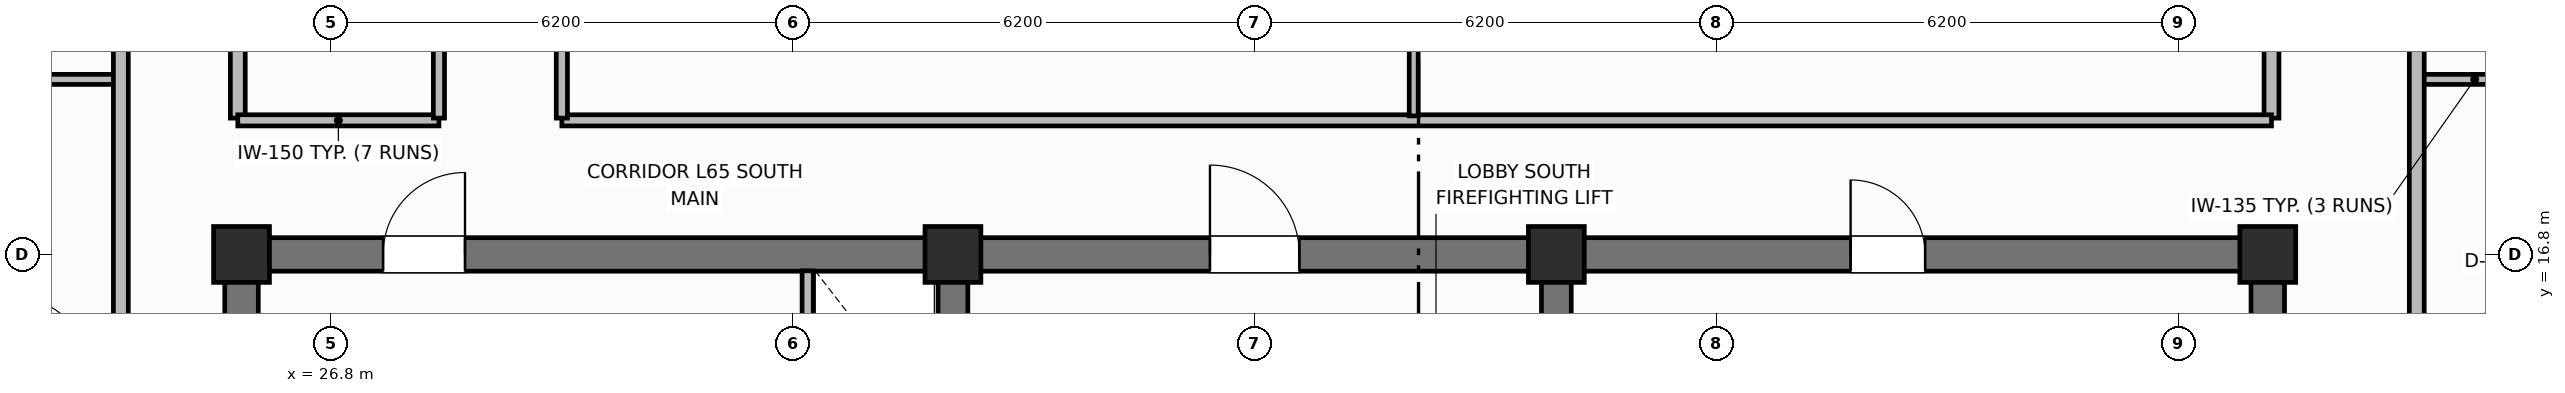
"""IFC4 building model, lengths in metres.
Left out: names, types, materials, properties, quantities, classifications, styles, units other than length and angle.
Written with IfcOpenShell. Run it as: python <this file> out.ifc"""

import sys

from ifc_helpers import new_model, si_unit, direction, frame, frame_2d, origin, origin_2d, place, context, subcontext, project, spatial, rectangle, extrude, element, fill, save


model = new_model("IFC4")
c1 = context("Model", 3, precision=1e-05, world=origin(), true_north=direction((0.0, 1.0)))
c2 = subcontext(c1, "Body", "Model", "MODEL_VIEW")
j1 = project(units=[si_unit("LENGTHUNIT", "METRE"), si_unit("PLANEANGLEUNIT", "RADIAN")], contexts=[c1])
p1 = place(None, origin())
s1 = spatial("IfcSite", under=j1, at=p1, CompositionType="ELEMENT")
p2 = place(p1, origin())
s2 = spatial("IfcBuilding", under=s1, at=p2, CompositionType="ELEMENT")
p3 = place(p2, frame((0.0, 0.0, 260.2)))
s3 = spatial("IfcBuildingStorey", under=s2, at=p3, CompositionType="ELEMENT", Elevation=260.2)
for number, where, z_axis, x_axis in (
    (1, (25.6, 10.825, 0.0), (0.0, 0.0, 1.0), (0.0, 1.0, 0.0)),
    (2, (52.8, 10.825, 0.0), (0.0, 0.0, 1.0), (0.0, 1.0, 0.0)),
):
    element("IfcWall", number, at=place(p3, frame(where, z_axis=z_axis, x_axis=x_axis)), inside=s3, PredefinedType="SHEAR", context=c2, shape_type="SweptSolid", body=[
        extrude(rectangle(XDim=5.75, YDim=0.45, at=frame_2d((2.875, 0.0))), origin(), (0.0, 0.0, 1.0), 3.7),
    ])
p4 = place(p3, frame((25.6, 16.8, 0.0), z_axis=(0.0, 0.0, 1.0), x_axis=(1.0, 0.0, 0.0)))
e3 = element("IfcWall", 3, at=p4, inside=s3, PredefinedType="SHEAR", context=c2, shape_type="SweptSolid", body=[
    extrude(rectangle(XDim=27.2, YDim=0.45, at=frame_2d((13.6, 0.0))), origin(), (0.0, 0.0, 1.0), 3.7),
])
p5 = place(p4, frame((1.9, 0.0, 0.0)))
e4 = element("IfcOpeningElement", 4, at=p5, cuts=e3, PredefinedType="OPENING", context=c2, shape_type="SweptSolid", body=[
    extrude(rectangle(XDim=1.1, YDim=2.15, at=frame_2d((0.55, 1.075))), frame((0.0, 0.235, 0.0), z_axis=(0.0, -1.0, 0.0), x_axis=(1.0, 0.0, 0.0)), (0.0, 0.0, 1.0), 0.47),
])
p6 = place(p4, frame((13.0, 0.0, 0.0)))
e5 = element("IfcOpeningElement", 5, at=p6, cuts=e3, PredefinedType="OPENING", context=c2, shape_type="SweptSolid", body=[
    extrude(rectangle(XDim=1.2, YDim=2.15, at=frame_2d((0.6, 1.075))), frame((0.0, 0.235, 0.0), z_axis=(0.0, -1.0, 0.0), x_axis=(1.0, 0.0, 0.0)), (0.0, 0.0, 1.0), 0.47),
])
p7 = place(p4, frame((21.6, 0.0, 0.0)))
e6 = element("IfcOpeningElement", 6, at=p7, cuts=e3, PredefinedType="OPENING", context=c2, shape_type="SweptSolid", body=[
    extrude(rectangle(XDim=1.0, YDim=2.15, at=frame_2d((0.5, 1.075))), frame((0.0, 0.235, 0.0), z_axis=(0.0, -1.0, 0.0), x_axis=(1.0, 0.0, 0.0)), (0.0, 0.0, 1.0), 0.47),
])
for number, where, z_axis, x_axis in (
    (7, (35.15, 10.825, 0.0), (0.0, 0.0, 1.0), (0.0, 1.0, 0.0)),
    (8, (43.25, 10.825, 0.0), (0.0, 0.0, 1.0), (0.0, 1.0, 0.0)),
):
    element("IfcWall", number, at=place(p3, frame(where, z_axis=z_axis, x_axis=x_axis)), inside=s3, PredefinedType="SHEAR", context=c2, shape_type="SweptSolid", body=[
        extrude(rectangle(XDim=5.75, YDim=0.4, at=frame_2d((2.875, 0.0))), origin(), (0.0, 0.0, 1.0), 3.7),
    ])
for number, where, z_axis, x_axis in (
    (9, (25.6, 16.8, 0.0), (0.0, 0.0, 1.0), (1.0, 0.0, 0.0)),
    (10, (35.15, 16.8, 0.0), (0.0, 0.0, 1.0), (1.0, 0.0, 0.0)),
    (11, (43.25, 16.8, 0.0), (0.0, 0.0, 1.0), (1.0, 0.0, 0.0)),
    (12, (52.8, 16.8, 0.0), (0.0, 0.0, 1.0), (1.0, 0.0, 0.0)),
):
    element("IfcColumn", number, at=place(p3, frame(where, z_axis=z_axis, x_axis=x_axis)), inside=s3, PredefinedType="COLUMN", context=c2, shape_type="SweptSolid", body=[
        extrude(rectangle(XDim=0.75, YDim=0.75, at=origin_2d()), origin(), (0.0, 0.0, 1.0), 3.7),
    ])
p8 = place(p3, frame((33.2, 14.5, 0.0), z_axis=(0.0, 0.0, 1.0), x_axis=(0.0, 1.0, 0.0)))
e13 = element("IfcWall", 13, at=p8, inside=s3, PredefinedType="PARTITIONING", context=c2, shape_type="SweptSolid", body=[
    extrude(rectangle(XDim=2.08, YDim=0.15, at=frame_2d((1.04, 0.0))), origin(), (0.0, 0.0, 1.0), 2.56),
])
p9 = place(p8, frame((0.55, 0.0, 0.0)))
e14 = element("IfcOpeningElement", 14, at=p9, cuts=e13, PredefinedType="OPENING", context=c2, shape_type="SweptSolid", body=[
    extrude(rectangle(XDim=0.85, YDim=2.05, at=frame_2d((0.425, 1.025))), frame((0.0, 0.085, 0.0), z_axis=(0.0, -1.0, 0.0), x_axis=(1.0, 0.0, 0.0)), (0.0, 0.0, 1.0), 0.17),
])
for number, where, z_axis, x_axis in (
    (15, (25.55, 18.63, 0.0), (0.0, 0.0, 1.0), (0.0, 1.0, 0.0)),
    (16, (52.85, 18.63, 0.0), (0.0, 0.0, 1.0), (0.0, 1.0, 0.0)),
):
    element("IfcWall", number, at=place(p3, frame(where, z_axis=z_axis, x_axis=x_axis)), inside=s3, PredefinedType="PARTITIONING", context=c2, shape_type="SweptSolid", body=[
        extrude(rectangle(XDim=19.14, YDim=0.2, at=frame_2d((9.57, 0.0))), origin(), (0.0, 0.0, 1.0), 2.56),
    ])
p10 = place(p3, frame((25.55, 18.6, 0.0), z_axis=(0.0, 0.0, 1.0), x_axis=(1.0, 0.0, 0.0)))
e17 = element("IfcWall", 17, at=p10, inside=s3, PredefinedType="PARTITIONING", context=c2, shape_type="SweptSolid", body=[
    extrude(rectangle(XDim=2.7, YDim=0.15, at=frame_2d((1.35, 0.0))), origin(), (0.0, 0.0, 1.0), 2.56),
])
p11 = place(p3, frame((29.9, 18.6, 0.0), z_axis=(0.0, 0.0, 1.0), x_axis=(1.0, 0.0, 0.0)))
e18 = element("IfcWall", 18, at=p11, inside=s3, PredefinedType="PARTITIONING", context=c2, shape_type="SweptSolid", body=[
    extrude(rectangle(XDim=22.95, YDim=0.15, at=frame_2d((11.475, 0.0))), origin(), (0.0, 0.0, 1.0), 2.56),
])
p12 = place(p3, frame((41.335, 18.66, 0.0), z_axis=(0.0, 0.0, 1.0), x_axis=(0.0, 1.0, 0.0)))
e19 = element("IfcWall", 19, at=p12, inside=s3, PredefinedType="PARTITIONING", context=c2, shape_type="SweptSolid", body=[
    extrude(rectangle(XDim=6.821, YDim=0.12, at=frame_2d((3.41, 0.0))), origin(), (0.0, 0.0, 1.0), 2.56),
])
p13 = place(p12, frame((2.0, 0.0, 0.0)))
e20 = element("IfcOpeningElement", 20, at=p13, cuts=e19, PredefinedType="OPENING", context=c2, shape_type="SweptSolid", body=[
    extrude(rectangle(XDim=0.9, YDim=2.1, at=frame_2d((0.45, 1.05))), frame((0.0, 0.07, 0.0), z_axis=(0.0, -1.0, 0.0), x_axis=(1.0, 0.0, 0.0)), (0.0, 0.0, 1.0), 0.14),
])
p14 = place(p3, frame((28.25, 18.63, 0.0), z_axis=(0.0, 0.0, 1.0), x_axis=(0.0, 1.0, 0.0)))
e21 = element("IfcWall", 21, at=p14, inside=s3, PredefinedType="PARTITIONING", context=c2, shape_type="SweptSolid", body=[
    extrude(rectangle(XDim=19.14, YDim=0.15, at=frame_2d((9.57, 0.0))), origin(), (0.0, 0.0, 1.0), 2.56),
])
p15 = place(p14, frame((3.0, 0.0, 0.0)))
e22 = element("IfcOpeningElement", 22, at=p15, cuts=e21, PredefinedType="OPENING", context=c2, shape_type="SweptSolid", body=[
    extrude(rectangle(XDim=0.9, YDim=2.1, at=frame_2d((0.45, 1.05))), frame((0.0, 0.085, 0.0), z_axis=(0.0, -1.0, 0.0), x_axis=(1.0, 0.0, 0.0)), (0.0, 0.0, 1.0), 0.17),
])
p16 = place(p14, frame((11.5, 0.0, 0.0)))
e23 = element("IfcOpeningElement", 23, at=p16, cuts=e21, PredefinedType="OPENING", context=c2, shape_type="SweptSolid", body=[
    extrude(rectangle(XDim=0.9, YDim=2.1, at=frame_2d((0.45, 1.05))), frame((0.0, 0.085, 0.0), z_axis=(0.0, -1.0, 0.0), x_axis=(1.0, 0.0, 0.0)), (0.0, 0.0, 1.0), 0.17),
])
p17 = place(p3, frame((29.9, 18.63, 0.0), z_axis=(0.0, 0.0, 1.0), x_axis=(0.0, 1.0, 0.0)))
e24 = element("IfcWall", 24, at=p17, inside=s3, PredefinedType="PARTITIONING", context=c2, shape_type="SweptSolid", body=[
    extrude(rectangle(XDim=19.14, YDim=0.15, at=frame_2d((9.57, 0.0))), origin(), (0.0, 0.0, 1.0), 2.56),
])
p18 = place(p17, frame((2.2, 0.0, 0.0)))
e25 = element("IfcOpeningElement", 25, at=p18, cuts=e24, PredefinedType="OPENING", context=c2, shape_type="SweptSolid", body=[
    extrude(rectangle(XDim=1.0, YDim=2.15, at=frame_2d((0.5, 1.075))), frame((0.0, 0.085, 0.0), z_axis=(0.0, -1.0, 0.0), x_axis=(1.0, 0.0, 0.0)), (0.0, 0.0, 1.0), 0.17),
])
p19 = place(p17, frame((8.89, 0.0, 0.0)))
e26 = element("IfcOpeningElement", 26, at=p19, cuts=e24, PredefinedType="OPENING", context=c2, shape_type="SweptSolid", body=[
    extrude(rectangle(XDim=1.0, YDim=2.15, at=frame_2d((0.5, 1.075))), frame((0.0, 0.085, 0.0), z_axis=(0.0, -1.0, 0.0), x_axis=(1.0, 0.0, 0.0)), (0.0, 0.0, 1.0), 0.17),
])
p20 = place(p3, frame((22.03, 19.15, 0.0), z_axis=(0.0, 0.0, 1.0), x_axis=(1.0, 0.0, 0.0)))
e27 = element("IfcWall", 27, at=p20, inside=s3, PredefinedType="PARTITIONING", context=c2, shape_type="SweptSolid", body=[
    extrude(rectangle(XDim=1.95, YDim=0.135, at=frame_2d((0.975, 0.0))), origin(), (0.0, 0.0, 1.0), 2.56),
])
p21 = place(p3, frame((23.98, 9.95, 0.0), z_axis=(0.0, 0.0, 1.0), x_axis=(0.0, 1.0, 0.0)))
e28 = element("IfcWall", 28, at=p21, inside=s3, PredefinedType="PARTITIONING", context=c2, shape_type="SweptSolid", body=[
    extrude(rectangle(XDim=36.5, YDim=0.2, at=frame_2d((18.25, 0.0))), origin(), (0.0, 0.0, 1.0), 2.56),
])
p22 = place(p21, frame((3.25, 0.0, 0.0)))
e29 = element("IfcOpeningElement", 29, at=p22, cuts=e28, PredefinedType="OPENING", context=c2, shape_type="SweptSolid", body=[
    extrude(rectangle(XDim=1.0, YDim=2.15, at=frame_2d((0.5, 1.075))), frame((0.0, 0.11, 0.0), z_axis=(0.0, -1.0, 0.0), x_axis=(1.0, 0.0, 0.0)), (0.0, 0.0, 1.0), 0.22),
])
p23 = place(p3, frame((54.8, 19.15, 0.0), z_axis=(0.0, 0.0, 1.0), x_axis=(1.0, 0.0, 0.0)))
e30 = element("IfcWall", 30, at=p23, inside=s3, PredefinedType="PARTITIONING", context=c2, shape_type="SweptSolid", body=[
    extrude(rectangle(XDim=1.95, YDim=0.135, at=frame_2d((0.975, 0.0))), origin(), (0.0, 0.0, 1.0), 2.56),
])
p24 = place(p3, frame((54.8, 9.95, 0.0), z_axis=(0.0, 0.0, 1.0), x_axis=(0.0, 1.0, 0.0)))
e31 = element("IfcWall", 31, at=p24, inside=s3, PredefinedType="PARTITIONING", context=c2, shape_type="SweptSolid", body=[
    extrude(rectangle(XDim=36.5, YDim=0.2, at=frame_2d((18.25, 0.0))), origin(), (0.0, 0.0, 1.0), 2.56),
])
p25 = place(p24, frame((3.25, 0.0, 0.0)))
e32 = element("IfcOpeningElement", 32, at=p25, cuts=e31, PredefinedType="OPENING", context=c2, shape_type="SweptSolid", body=[
    extrude(rectangle(XDim=1.0, YDim=2.15, at=frame_2d((0.5, 1.075))), frame((0.0, 0.11, 0.0), z_axis=(0.0, -1.0, 0.0), x_axis=(1.0, 0.0, 0.0)), (0.0, 0.0, 1.0), 0.22),
])
p26 = place(p5, origin())
e33 = element("IfcDoor", 33, at=p26, inside=s3, OperationType="SINGLE_SWING_RIGHT", PredefinedType="DOOR", context=c2, shape_type="SweptSolid", body=[
    extrude(rectangle(XDim=1.1, YDim=2.15, at=frame_2d((0.55, 1.075))), frame((0.0, 0.025, 0.0), z_axis=(0.0, -1.0, 0.0), x_axis=(1.0, 0.0, 0.0)), (0.0, 0.0, 1.0), 0.05),
])
fill(e4, e33)
p27 = place(p6, origin())
e34 = element("IfcDoor", 34, at=p27, inside=s3, OperationType="SINGLE_SWING_LEFT", PredefinedType="DOOR", context=c2, shape_type="SweptSolid", body=[
    extrude(rectangle(XDim=1.2, YDim=2.15, at=frame_2d((0.6, 1.075))), frame((0.0, 0.025, 0.0), z_axis=(0.0, -1.0, 0.0), x_axis=(1.0, 0.0, 0.0)), (0.0, 0.0, 1.0), 0.05),
])
fill(e5, e34)
p28 = place(p7, origin())
e35 = element("IfcDoor", 35, at=p28, inside=s3, OperationType="SINGLE_SWING_LEFT", PredefinedType="DOOR", context=c2, shape_type="SweptSolid", body=[
    extrude(rectangle(XDim=1.0, YDim=2.15, at=frame_2d((0.5, 1.075))), frame((0.0, 0.025, 0.0), z_axis=(0.0, -1.0, 0.0), x_axis=(1.0, 0.0, 0.0)), (0.0, 0.0, 1.0), 0.05),
])
fill(e6, e35)
save(model, sys.argv[1])
